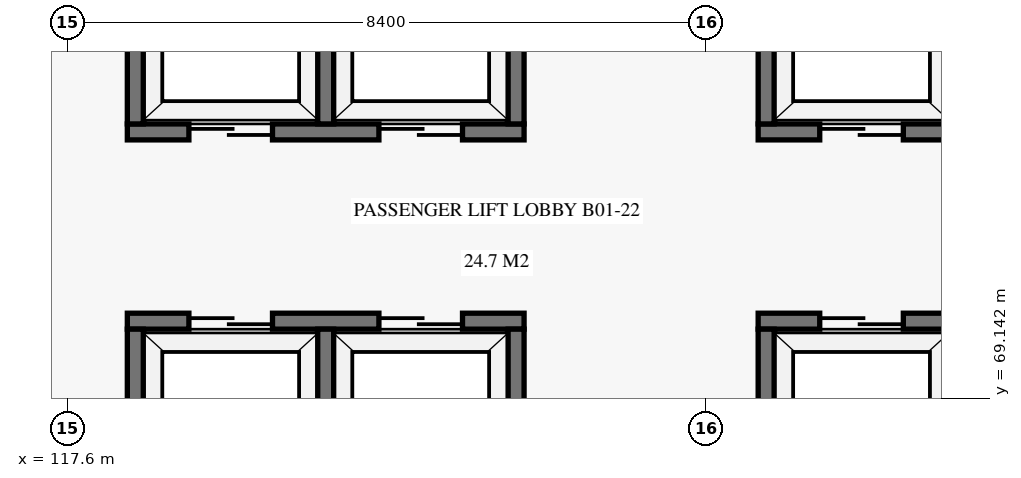
"""IFC4 building model, lengths in metres.
Left out: names, types, materials, properties, quantities, classifications, styles, units other than length and angle.
Written with IfcOpenShell. Run it as: python <this file> out.ifc"""

import sys

from ifc_helpers import new_model, si_unit, direction, frame, frame_2d, origin, place, context, subcontext, project, spatial, rectangle, extrude, element, fill, save


model = new_model("IFC4")
c1 = context("Model", 3, precision=1e-05, world=origin(), true_north=direction((0.0, 1.0)))
c2 = subcontext(c1, "Body", "Model", "MODEL_VIEW")
j1 = project(units=[si_unit("LENGTHUNIT", "METRE"), si_unit("PLANEANGLEUNIT", "RADIAN")], contexts=[c1])
p1 = place(None, origin())
s1 = spatial("IfcSite", under=j1, at=p1, CompositionType="ELEMENT")
p2 = place(p1, origin())
s2 = spatial("IfcBuilding", under=s1, at=p2, CompositionType="ELEMENT")
p3 = place(p2, frame((0.0, 0.0, -4.2)))
s3 = spatial("IfcBuildingStorey", under=s2, at=p3, CompositionType="ELEMENT", Elevation=-4.2)
p4 = place(p3, frame((126.69, 70.155, 0.0), z_axis=(0.0, 0.0, 1.0), x_axis=(1.0, 0.0, 0.0)))
e1 = element("IfcWall", 1, at=p4, inside=s3, PredefinedType="SHEAR", context=c2, shape_type="SweptSolid", body=[
    extrude(rectangle(XDim=5.22, YDim=0.21, at=frame_2d((2.61, 0.0))), origin(), (0.0, 0.0, 1.0), 3.88),
])
p5 = place(p4, frame((0.81, 0.0, 0.0)))
e2 = element("IfcOpeningElement", 2, at=p5, cuts=e1, PredefinedType="OPENING", context=c2, shape_type="SweptSolid", body=[
    extrude(rectangle(XDim=1.1, YDim=2.15, at=frame_2d((0.55, 1.075))), frame((0.0, 0.115, 0.0), z_axis=(0.0, -1.0, 0.0), x_axis=(1.0, 0.0, 0.0)), (0.0, 0.0, 1.0), 0.23),
])
p6 = place(p4, frame((3.31, 0.0, 0.0)))
e3 = element("IfcOpeningElement", 3, at=p6, cuts=e1, PredefinedType="OPENING", context=c2, shape_type="SweptSolid", body=[
    extrude(rectangle(XDim=1.1, YDim=2.15, at=frame_2d((0.55, 1.075))), frame((0.0, 0.115, 0.0), z_axis=(0.0, -1.0, 0.0), x_axis=(1.0, 0.0, 0.0)), (0.0, 0.0, 1.0), 0.23),
])
p7 = place(p3, frame((126.795, 67.85, 0.0), z_axis=(0.0, 0.0, 1.0), x_axis=(0.0, 1.0, 0.0)))
e4 = element("IfcWall", 4, at=p7, inside=s3, PredefinedType="SHEAR", context=c2, shape_type="SweptSolid", body=[
    extrude(rectangle(XDim=2.2, YDim=0.21, at=frame_2d((1.1, 0.0))), origin(), (0.0, 0.0, 1.0), 3.88),
])
p8 = place(p3, frame((126.69, 72.645, 0.0), z_axis=(0.0, 0.0, 1.0), x_axis=(1.0, 0.0, 0.0)))
e5 = element("IfcWall", 5, at=p8, inside=s3, PredefinedType="SHEAR", context=c2, shape_type="SweptSolid", body=[
    extrude(rectangle(XDim=5.22, YDim=0.21, at=frame_2d((2.61, 0.0))), origin(), (0.0, 0.0, 1.0), 3.88),
])
p9 = place(p8, frame((0.81, 0.0, 0.0)))
e6 = element("IfcOpeningElement", 6, at=p9, cuts=e5, PredefinedType="OPENING", context=c2, shape_type="SweptSolid", body=[
    extrude(rectangle(XDim=1.1, YDim=2.15, at=frame_2d((0.55, 1.075))), frame((0.0, 0.115, 0.0), z_axis=(0.0, -1.0, 0.0), x_axis=(1.0, 0.0, 0.0)), (0.0, 0.0, 1.0), 0.23),
])
p10 = place(p8, frame((3.31, 0.0, 0.0)))
e7 = element("IfcOpeningElement", 7, at=p10, cuts=e5, PredefinedType="OPENING", context=c2, shape_type="SweptSolid", body=[
    extrude(rectangle(XDim=1.1, YDim=2.15, at=frame_2d((0.55, 1.075))), frame((0.0, 0.115, 0.0), z_axis=(0.0, -1.0, 0.0), x_axis=(1.0, 0.0, 0.0)), (0.0, 0.0, 1.0), 0.23),
])
p11 = place(p3, frame((126.795, 72.75, 0.0), z_axis=(0.0, 0.0, 1.0), x_axis=(0.0, 1.0, 0.0)))
e8 = element("IfcWall", 8, at=p11, inside=s3, PredefinedType="SHEAR", context=c2, shape_type="SweptSolid", body=[
    extrude(rectangle(XDim=2.2, YDim=0.21, at=frame_2d((1.1, 0.0))), origin(), (0.0, 0.0, 1.0), 3.88),
])
p12 = place(p3, frame((118.39, 70.155, 0.0), z_axis=(0.0, 0.0, 1.0), x_axis=(1.0, 0.0, 0.0)))
e9 = element("IfcWall", 9, at=p12, inside=s3, PredefinedType="SHEAR", context=c2, shape_type="SweptSolid", body=[
    extrude(rectangle(XDim=5.22, YDim=0.21, at=frame_2d((2.61, 0.0))), origin(), (0.0, 0.0, 1.0), 3.88),
])
p13 = place(p12, frame((0.81, 0.0, 0.0)))
e10 = element("IfcOpeningElement", 10, at=p13, cuts=e9, PredefinedType="OPENING", context=c2, shape_type="SweptSolid", body=[
    extrude(rectangle(XDim=1.1, YDim=2.15, at=frame_2d((0.55, 1.075))), frame((0.0, 0.115, 0.0), z_axis=(0.0, -1.0, 0.0), x_axis=(1.0, 0.0, 0.0)), (0.0, 0.0, 1.0), 0.23),
])
p14 = place(p12, frame((3.31, 0.0, 0.0)))
e11 = element("IfcOpeningElement", 11, at=p14, cuts=e9, PredefinedType="OPENING", context=c2, shape_type="SweptSolid", body=[
    extrude(rectangle(XDim=1.1, YDim=2.15, at=frame_2d((0.55, 1.075))), frame((0.0, 0.115, 0.0), z_axis=(0.0, -1.0, 0.0), x_axis=(1.0, 0.0, 0.0)), (0.0, 0.0, 1.0), 0.23),
])
for number, where, z_axis, x_axis in (
    (12, (118.495, 67.85, 0.0), (0.0, 0.0, 1.0), (0.0, 1.0, 0.0)),
    (13, (123.505, 67.85, 0.0), (0.0, 0.0, 1.0), (0.0, 1.0, 0.0)),
    (14, (121.0, 67.85, 0.0), (0.0, 0.0, 1.0), (0.0, 1.0, 0.0)),
):
    element("IfcWall", number, at=place(p3, frame(where, z_axis=z_axis, x_axis=x_axis)), inside=s3, PredefinedType="SHEAR", context=c2, shape_type="SweptSolid", body=[
        extrude(rectangle(XDim=2.2, YDim=0.21, at=frame_2d((1.1, 0.0))), origin(), (0.0, 0.0, 1.0), 3.88),
    ])
p15 = place(p3, frame((118.39, 72.645, 0.0), z_axis=(0.0, 0.0, 1.0), x_axis=(1.0, 0.0, 0.0)))
e15 = element("IfcWall", 15, at=p15, inside=s3, PredefinedType="SHEAR", context=c2, shape_type="SweptSolid", body=[
    extrude(rectangle(XDim=5.22, YDim=0.21, at=frame_2d((2.61, 0.0))), origin(), (0.0, 0.0, 1.0), 3.88),
])
p16 = place(p15, frame((0.81, 0.0, 0.0)))
e16 = element("IfcOpeningElement", 16, at=p16, cuts=e15, PredefinedType="OPENING", context=c2, shape_type="SweptSolid", body=[
    extrude(rectangle(XDim=1.1, YDim=2.15, at=frame_2d((0.55, 1.075))), frame((0.0, 0.115, 0.0), z_axis=(0.0, -1.0, 0.0), x_axis=(1.0, 0.0, 0.0)), (0.0, 0.0, 1.0), 0.23),
])
p17 = place(p15, frame((3.31, 0.0, 0.0)))
e17 = element("IfcOpeningElement", 17, at=p17, cuts=e15, PredefinedType="OPENING", context=c2, shape_type="SweptSolid", body=[
    extrude(rectangle(XDim=1.1, YDim=2.15, at=frame_2d((0.55, 1.075))), frame((0.0, 0.115, 0.0), z_axis=(0.0, -1.0, 0.0), x_axis=(1.0, 0.0, 0.0)), (0.0, 0.0, 1.0), 0.23),
])
for number, where, z_axis, x_axis in (
    (18, (118.495, 72.75, 0.0), (0.0, 0.0, 1.0), (0.0, 1.0, 0.0)),
    (19, (123.505, 72.75, 0.0), (0.0, 0.0, 1.0), (0.0, 1.0, 0.0)),
    (20, (121.0, 72.75, 0.0), (0.0, 0.0, 1.0), (0.0, 1.0, 0.0)),
):
    element("IfcWall", number, at=place(p3, frame(where, z_axis=z_axis, x_axis=x_axis)), inside=s3, PredefinedType="SHEAR", context=c2, shape_type="SweptSolid", body=[
        extrude(rectangle(XDim=2.2, YDim=0.21, at=frame_2d((1.1, 0.0))), origin(), (0.0, 0.0, 1.0), 3.88),
    ])
p18 = place(p5, origin())
e21 = element("IfcDoor", 21, at=p18, inside=s3, OperationType="DOUBLE_DOOR_SLIDING", PredefinedType="DOOR", context=c2, shape_type="SweptSolid", body=[
    extrude(rectangle(XDim=1.1, YDim=2.15, at=frame_2d((0.55, 1.075))), frame((0.0, 0.025, 0.0), z_axis=(0.0, -1.0, 0.0), x_axis=(1.0, 0.0, 0.0)), (0.0, 0.0, 1.0), 0.05),
])
fill(e2, e21)
p19 = place(p9, origin())
e22 = element("IfcDoor", 22, at=p19, inside=s3, OperationType="DOUBLE_DOOR_SLIDING", PredefinedType="DOOR", context=c2, shape_type="SweptSolid", body=[
    extrude(rectangle(XDim=1.1, YDim=2.15, at=frame_2d((0.55, 1.075))), frame((0.0, 0.025, 0.0), z_axis=(0.0, -1.0, 0.0), x_axis=(1.0, 0.0, 0.0)), (0.0, 0.0, 1.0), 0.05),
])
fill(e6, e22)
p20 = place(p13, origin())
e23 = element("IfcDoor", 23, at=p20, inside=s3, OperationType="DOUBLE_DOOR_SLIDING", PredefinedType="DOOR", context=c2, shape_type="SweptSolid", body=[
    extrude(rectangle(XDim=1.1, YDim=2.15, at=frame_2d((0.55, 1.075))), frame((0.0, 0.025, 0.0), z_axis=(0.0, -1.0, 0.0), x_axis=(1.0, 0.0, 0.0)), (0.0, 0.0, 1.0), 0.05),
])
fill(e10, e23)
p21 = place(p14, origin())
e24 = element("IfcDoor", 24, at=p21, inside=s3, OperationType="DOUBLE_DOOR_SLIDING", PredefinedType="DOOR", context=c2, shape_type="SweptSolid", body=[
    extrude(rectangle(XDim=1.1, YDim=2.15, at=frame_2d((0.55, 1.075))), frame((0.0, 0.025, 0.0), z_axis=(0.0, -1.0, 0.0), x_axis=(1.0, 0.0, 0.0)), (0.0, 0.0, 1.0), 0.05),
])
fill(e11, e24)
p22 = place(p16, origin())
e25 = element("IfcDoor", 25, at=p22, inside=s3, OperationType="DOUBLE_DOOR_SLIDING", PredefinedType="DOOR", context=c2, shape_type="SweptSolid", body=[
    extrude(rectangle(XDim=1.1, YDim=2.15, at=frame_2d((0.55, 1.075))), frame((0.0, 0.025, 0.0), z_axis=(0.0, -1.0, 0.0), x_axis=(1.0, 0.0, 0.0)), (0.0, 0.0, 1.0), 0.05),
])
fill(e16, e25)
p23 = place(p17, origin())
e26 = element("IfcDoor", 26, at=p23, inside=s3, OperationType="DOUBLE_DOOR_SLIDING", PredefinedType="DOOR", context=c2, shape_type="SweptSolid", body=[
    extrude(rectangle(XDim=1.1, YDim=2.15, at=frame_2d((0.55, 1.075))), frame((0.0, 0.025, 0.0), z_axis=(0.0, -1.0, 0.0), x_axis=(1.0, 0.0, 0.0)), (0.0, 0.0, 1.0), 0.05),
])
fill(e17, e26)
save(model, sys.argv[1])
